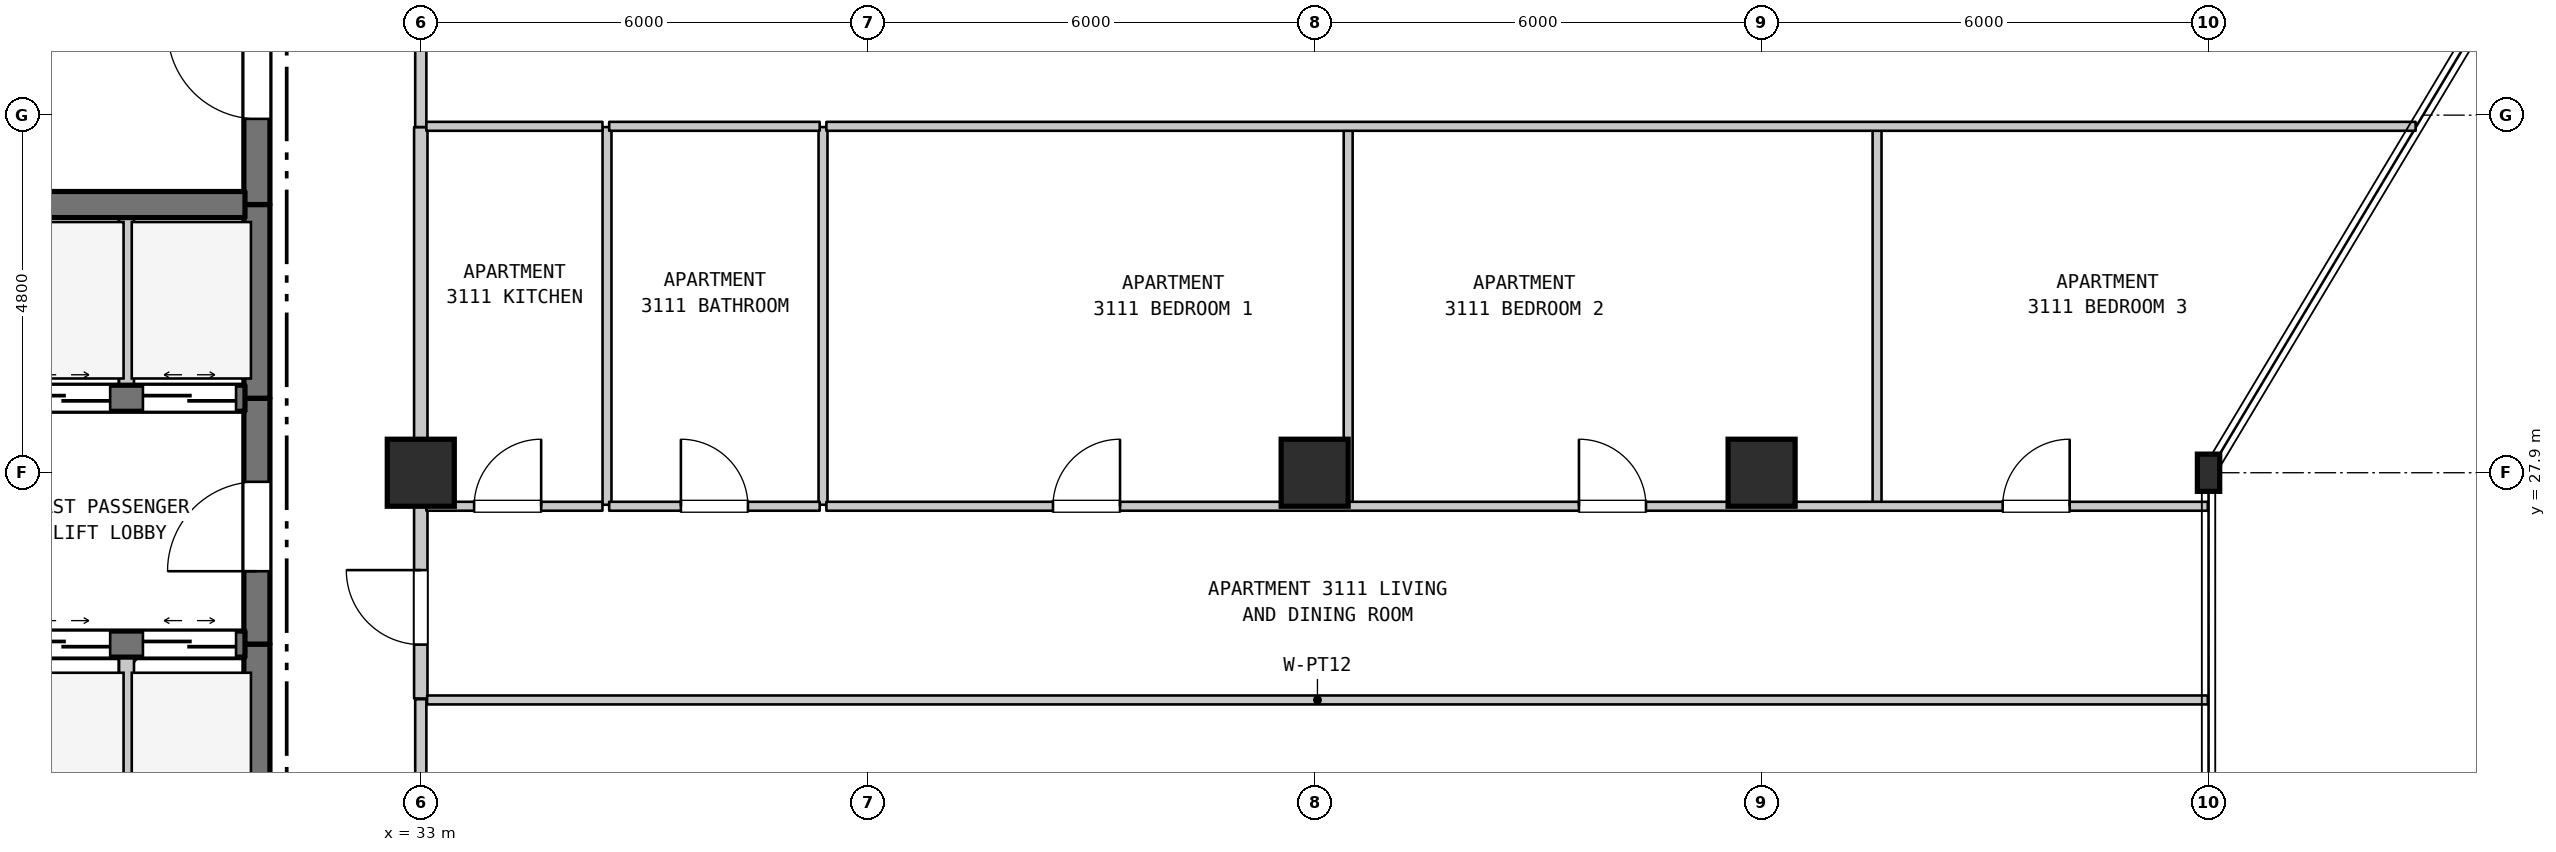
"""IFC4 building model, lengths in metres.
Left out: names, types, materials, properties, quantities, classifications, styles, units other than length and angle.
Written with IfcOpenShell. Run it as: python <this file> out.ifc"""

import sys

from ifc_helpers import new_model, si_unit, direction, frame, frame_2d, origin, origin_2d, place, context, subcontext, project, spatial, rectangle, i_section, extrude, element, fill, save


model = new_model("IFC4")
c1 = context("Model", 3, precision=1e-05, world=origin(), true_north=direction((0.0, 1.0)))
c2 = subcontext(c1, "Body", "Model", "MODEL_VIEW")
j1 = project(units=[si_unit("LENGTHUNIT", "METRE"), si_unit("PLANEANGLEUNIT", "RADIAN")], contexts=[c1])
p1 = place(None, origin())
s1 = spatial("IfcSite", under=j1, at=p1, CompositionType="ELEMENT")
p2 = place(p1, origin())
s2 = spatial("IfcBuilding", under=s1, at=p2, CompositionType="ELEMENT")
p3 = place(p2, frame((0.0, 0.0, 129.8)))
s3 = spatial("IfcBuildingStorey", under=s2, at=p3, CompositionType="ELEMENT", Elevation=129.8)
for number, where, z_axis, x_axis in (
    (1, (33.0, 27.9, 0.0), (0.0, 0.0, 1.0), (1.0, 0.0, 0.0)),
    (2, (45.0, 27.9, 0.0), (0.0, 0.0, 1.0), (1.0, 0.0, 0.0)),
    (3, (51.0, 27.9, 0.0), (0.0, 0.0, 1.0), (1.0, 0.0, 0.0)),
):
    element("IfcColumn", number, at=place(p3, frame(where, z_axis=z_axis, x_axis=x_axis)), inside=s3, PredefinedType="COLUMN", context=c2, shape_type="SweptSolid", body=[
        extrude(rectangle(XDim=0.9, YDim=0.9, at=origin_2d()), origin(), (0.0, 0.0, 1.0), 3.7),
    ])
p4 = place(p3, frame((57.0, 27.9, 0.0), z_axis=(0.0, 0.0, 1.0), x_axis=(1.0, 0.0, 0.0)))
e4 = element("IfcColumn", 4, at=p4, inside=s3, PredefinedType="COLUMN", context=c2, shape_type="SweptSolid", body=[
    extrude(i_section(OverallWidth=0.3, OverallDepth=0.5, WebThickness=0.014, FlangeThickness=0.028, FilletRadius=0.027, at=origin_2d()), origin(), (0.0, 0.0, 1.0), 3.7),
])
p5 = place(p3, frame((29.05, 22.7, 0.0), z_axis=(0.0, 0.0, 1.0), x_axis=(0.0, 1.0, 0.0)))
e5 = element("IfcWall", 5, at=p5, inside=s3, PredefinedType="STANDARD", context=c2, shape_type="SweptSolid", body=[
    extrude(rectangle(XDim=2.9, YDim=0.2, at=frame_2d((1.45, 0.0))), origin(), (0.0, 0.0, 1.0), 3.385),
])
p6 = place(p3, frame((29.05, 28.9, 0.0), z_axis=(0.0, 0.0, 1.0), x_axis=(0.0, 1.0, 0.0)))
e6 = element("IfcWall", 6, at=p6, inside=s3, PredefinedType="STANDARD", context=c2, shape_type="SweptSolid", body=[
    extrude(rectangle(XDim=2.6, YDim=0.2, at=frame_2d((1.3, 0.0))), origin(), (0.0, 0.0, 1.0), 3.385),
])
p7 = place(p3, frame((30.8, 22.7, 0.0), z_axis=(0.0, 0.0, 1.0), x_axis=(0.0, 1.0, 0.0)))
e7 = element("IfcWall", 7, at=p7, inside=s3, PredefinedType="SHEAR", context=c2, shape_type="SweptSolid", body=[
    extrude(rectangle(XDim=2.9, YDim=0.35, at=frame_2d((1.45, 0.0))), origin(), (0.0, 0.0, 1.0), 3.385),
])
p8 = place(p3, frame((30.8, 25.6, 0.0), z_axis=(0.0, 0.0, 1.0), x_axis=(0.0, 1.0, 0.0)))
e8 = element("IfcWall", 8, at=p8, inside=s3, PredefinedType="SHEAR", context=c2, shape_type="SweptSolid", body=[
    extrude(rectangle(XDim=3.3, YDim=0.35, at=frame_2d((1.65, 0.0))), origin(), (0.0, 0.0, 1.0), 3.385),
])
p9 = place(p8, frame((0.978, 0.0, 0.0)))
e9 = element("IfcOpeningElement", 9, at=p9, cuts=e8, PredefinedType="OPENING", context=c2, shape_type="SweptSolid", body=[
    extrude(rectangle(XDim=1.2, YDim=2.2, at=frame_2d((0.6, 1.1))), frame((0.0, 0.185, 0.0), z_axis=(0.0, -1.0, 0.0), x_axis=(1.0, 0.0, 0.0)), (0.0, 0.0, 1.0), 0.37),
])
p10 = place(p3, frame((30.8, 28.9, 0.0), z_axis=(0.0, 0.0, 1.0), x_axis=(0.0, 1.0, 0.0)))
e10 = element("IfcWall", 10, at=p10, inside=s3, PredefinedType="SHEAR", context=c2, shape_type="SweptSolid", body=[
    extrude(rectangle(XDim=2.6, YDim=0.35, at=frame_2d((1.3, 0.0))), origin(), (0.0, 0.0, 1.0), 3.385),
])
p11 = place(p3, frame((30.8, 31.5, 0.0), z_axis=(0.0, 0.0, 1.0), x_axis=(0.0, 1.0, 0.0)))
e11 = element("IfcWall", 11, at=p11, inside=s3, PredefinedType="SHEAR", context=c2, shape_type="SweptSolid", body=[
    extrude(rectangle(XDim=3.5, YDim=0.35, at=frame_2d((1.75, 0.0))), origin(), (0.0, 0.0, 1.0), 3.385),
])
p12 = place(p11, frame((1.15, 0.0, 0.0)))
e12 = element("IfcOpeningElement", 12, at=p12, cuts=e11, PredefinedType="OPENING", context=c2, shape_type="SweptSolid", body=[
    extrude(rectangle(XDim=1.2, YDim=2.2, at=frame_2d((0.6, 1.1))), frame((0.0, 0.185, 0.0), z_axis=(0.0, -1.0, 0.0), x_axis=(1.0, 0.0, 0.0)), (0.0, 0.0, 1.0), 0.37),
])
p13 = place(p3, frame((33.0, 19.51, 0.0), z_axis=(0.0, 0.0, 1.0), x_axis=(0.0, 1.0, 0.0)))
e13 = element("IfcWall", 13, at=p13, inside=s3, PredefinedType="STANDARD", context=c2, shape_type="SweptSolid", body=[
    extrude(rectangle(XDim=5.35, YDim=0.15, at=frame_2d((2.675, 0.0))), origin(), (0.0, 0.0, 1.0), 2.935),
])
p14 = place(p13, frame((1.534, 0.0, 0.0)))
e14 = element("IfcOpeningElement", 14, at=p14, cuts=e13, PredefinedType="OPENING", context=c2, shape_type="SweptSolid", body=[
    extrude(rectangle(XDim=1.0, YDim=2.15, at=frame_2d((0.5, 1.075))), frame((0.0, 0.085, 0.0), z_axis=(0.0, -1.0, 0.0), x_axis=(1.0, 0.0, 0.0)), (0.0, 0.0, 1.0), 0.17),
])
p15 = place(p3, frame((33.0, 24.87, 0.0), z_axis=(0.0, 0.0, 1.0), x_axis=(0.0, 1.0, 0.0)))
e15 = element("IfcWall", 15, at=p15, inside=s3, PredefinedType="STANDARD", context=c2, shape_type="SweptSolid", body=[
    extrude(rectangle(XDim=2.6, YDim=0.18, at=frame_2d((1.3, 0.0))), origin(), (0.0, 0.0, 1.0), 2.935),
])
p16 = place(p15, frame((0.723, 0.0, 0.0)))
e16 = element("IfcOpeningElement", 16, at=p16, cuts=e15, PredefinedType="OPENING", context=c2, shape_type="SweptSolid", body=[
    extrude(rectangle(XDim=1.0, YDim=2.15, at=frame_2d((0.5, 1.075))), frame((0.0, 0.1, 0.0), z_axis=(0.0, -1.0, 0.0), x_axis=(1.0, 0.0, 0.0)), (0.0, 0.0, 1.0), 0.2),
])
p17 = place(p3, frame((33.0, 27.47, 0.0), z_axis=(0.0, 0.0, 1.0), x_axis=(0.0, 1.0, 0.0)))
e17 = element("IfcWall", 17, at=p17, inside=s3, PredefinedType="STANDARD", context=c2, shape_type="SweptSolid", body=[
    extrude(rectangle(XDim=5.07, YDim=0.18, at=frame_2d((2.535, 0.0))), origin(), (0.0, 0.0, 1.0), 2.885),
])
p18 = place(p3, frame((33.0, 32.54, 0.0), z_axis=(0.0, 0.0, 1.0), x_axis=(0.0, 1.0, 0.0)))
e18 = element("IfcWall", 18, at=p18, inside=s3, PredefinedType="STANDARD", context=c2, shape_type="SweptSolid", body=[
    extrude(rectangle(XDim=5.36, YDim=0.15, at=frame_2d((2.68, 0.0))), origin(), (0.0, 0.0, 1.0), 2.885),
])
p19 = place(p18, frame((2.109, 0.0, 0.0)))
e19 = element("IfcOpeningElement", 19, at=p19, cuts=e18, PredefinedType="OPENING", context=c2, shape_type="SweptSolid", body=[
    extrude(rectangle(XDim=1.0, YDim=2.15, at=frame_2d((0.5, 1.075))), frame((0.0, 0.085, 0.0), z_axis=(0.0, -1.0, 0.0), x_axis=(1.0, 0.0, 0.0)), (0.0, 0.0, 1.0), 0.17),
])
for number, where, z_axis, x_axis in (
    (20, (35.5, 27.47, 0.0), (0.0, 0.0, 1.0), (0.0, 1.0, 0.0)),
    (21, (38.4, 27.47, 0.0), (0.0, 0.0, 1.0), (0.0, 1.0, 0.0)),
    (22, (45.45, 27.47, 0.0), (0.0, 0.0, 1.0), (0.0, 1.0, 0.0)),
    (23, (52.55, 27.47, 0.0), (0.0, 0.0, 1.0), (0.0, 1.0, 0.0)),
):
    element("IfcWall", number, at=place(p3, frame(where, z_axis=z_axis, x_axis=x_axis)), inside=s3, PredefinedType="PARTITIONING", context=c2, shape_type="SweptSolid", body=[
        extrude(rectangle(XDim=5.07, YDim=0.12, at=frame_2d((2.535, 0.0))), origin(), (0.0, 0.0, 1.0), 3.385),
    ])
p20 = place(p3, frame((33.085, 24.85, 0.0), z_axis=(0.0, 0.0, 1.0), x_axis=(1.0, 0.0, 0.0)))
e24 = element("IfcWall", 24, at=p20, inside=s3, PredefinedType="PARTITIONING", context=c2, shape_type="SweptSolid", body=[
    extrude(rectangle(XDim=23.905, YDim=0.12, at=frame_2d((11.953, 0.0))), origin(), (0.0, 0.0, 1.0), 3.385),
])
p21 = place(p3, frame((27.46, 25.6, 0.0), z_axis=(0.0, 0.0, 1.0), x_axis=(1.0, 0.0, 0.0)))
e25 = element("IfcWall", 25, at=p21, inside=s3, PredefinedType="SHEAR", context=c2, shape_type="SweptSolid", body=[
    extrude(rectangle(XDim=3.18, YDim=0.35, at=frame_2d((1.59, 0.0))), origin(), (0.0, 0.0, 1.0), 3.385),
])
p22 = place(p21, frame((0.12, 0.0, 0.0)))
e26 = element("IfcOpeningElement", 26, at=p22, cuts=e25, PredefinedType="OPENING", context=c2, shape_type="SweptSolid", body=[
    extrude(rectangle(XDim=1.25, YDim=2.2, at=frame_2d((0.625, 1.1))), frame((0.0, 0.185, 0.0), z_axis=(0.0, -1.0, 0.0), x_axis=(1.0, 0.0, 0.0)), (0.0, 0.0, 1.0), 0.37),
])
p23 = place(p21, frame((1.81, 0.0, 0.0)))
e27 = element("IfcOpeningElement", 27, at=p23, cuts=e25, PredefinedType="OPENING", context=c2, shape_type="SweptSolid", body=[
    extrude(rectangle(XDim=1.25, YDim=2.2, at=frame_2d((0.625, 1.1))), frame((0.0, 0.185, 0.0), z_axis=(0.0, -1.0, 0.0), x_axis=(1.0, 0.0, 0.0)), (0.0, 0.0, 1.0), 0.37),
])
p24 = place(p3, frame((33.075, 27.45, 0.0), z_axis=(0.0, 0.0, 1.0), x_axis=(1.0, 0.0, 0.0)))
e28 = element("IfcWall", 28, at=p24, inside=s3, PredefinedType="PARTITIONING", context=c2, shape_type="SweptSolid", body=[
    extrude(rectangle(XDim=2.364, YDim=0.12, at=frame_2d((1.182, 0.0))), origin(), (0.0, 0.0, 1.0), 3.385),
])
p25 = place(p24, frame((0.641, 0.0, 0.0)))
e29 = element("IfcOpeningElement", 29, at=p25, cuts=e28, PredefinedType="OPENING", context=c2, shape_type="SweptSolid", body=[
    extrude(rectangle(XDim=0.9, YDim=2.15, at=frame_2d((0.45, 1.075))), frame((0.0, 0.07, 0.0), z_axis=(0.0, -1.0, 0.0), x_axis=(1.0, 0.0, 0.0)), (0.0, 0.0, 1.0), 0.14),
])
p26 = place(p3, frame((35.529, 27.45, 0.0), z_axis=(0.0, 0.0, 1.0), x_axis=(1.0, 0.0, 0.0)))
e30 = element("IfcWall", 30, at=p26, inside=s3, PredefinedType="PARTITIONING", context=c2, shape_type="SweptSolid", body=[
    extrude(rectangle(XDim=2.826, YDim=0.12, at=frame_2d((1.413, 0.0))), origin(), (0.0, 0.0, 1.0), 3.385),
])
p27 = place(p26, frame((0.963, 0.0, 0.0)))
e31 = element("IfcOpeningElement", 31, at=p27, cuts=e30, PredefinedType="OPENING", context=c2, shape_type="SweptSolid", body=[
    extrude(rectangle(XDim=0.9, YDim=2.1, at=frame_2d((0.45, 1.05))), frame((0.0, 0.07, 0.0), z_axis=(0.0, -1.0, 0.0), x_axis=(1.0, 0.0, 0.0)), (0.0, 0.0, 1.0), 0.14),
])
p28 = place(p3, frame((38.445, 27.45, 0.0), z_axis=(0.0, 0.0, 1.0), x_axis=(1.0, 0.0, 0.0)))
e32 = element("IfcWall", 32, at=p28, inside=s3, PredefinedType="PARTITIONING", context=c2, shape_type="SweptSolid", body=[
    extrude(rectangle(XDim=18.545, YDim=0.12, at=frame_2d((9.272, 0.0))), origin(), (0.0, 0.0, 1.0), 3.385),
])
p29 = place(p28, frame((3.042, 0.0, 0.0)))
e33 = element("IfcOpeningElement", 33, at=p29, cuts=e32, PredefinedType="OPENING", context=c2, shape_type="SweptSolid", body=[
    extrude(rectangle(XDim=0.9, YDim=2.15, at=frame_2d((0.45, 1.075))), frame((0.0, 0.07, 0.0), z_axis=(0.0, -1.0, 0.0), x_axis=(1.0, 0.0, 0.0)), (0.0, 0.0, 1.0), 0.14),
])
p30 = place(p28, frame((10.103, 0.0, 0.0)))
e34 = element("IfcOpeningElement", 34, at=p30, cuts=e32, PredefinedType="OPENING", context=c2, shape_type="SweptSolid", body=[
    extrude(rectangle(XDim=0.9, YDim=2.15, at=frame_2d((0.45, 1.075))), frame((0.0, 0.07, 0.0), z_axis=(0.0, -1.0, 0.0), x_axis=(1.0, 0.0, 0.0)), (0.0, 0.0, 1.0), 0.14),
])
p31 = place(p28, frame((15.791, 0.0, 0.0)))
e35 = element("IfcOpeningElement", 35, at=p31, cuts=e32, PredefinedType="OPENING", context=c2, shape_type="SweptSolid", body=[
    extrude(rectangle(XDim=0.9, YDim=2.15, at=frame_2d((0.45, 1.075))), frame((0.0, 0.07, 0.0), z_axis=(0.0, -1.0, 0.0), x_axis=(1.0, 0.0, 0.0)), (0.0, 0.0, 1.0), 0.14),
])
p32 = place(p3, frame((27.46, 28.9, 0.0), z_axis=(0.0, 0.0, 1.0), x_axis=(1.0, 0.0, 0.0)))
e36 = element("IfcWall", 36, at=p32, inside=s3, PredefinedType="SHEAR", context=c2, shape_type="SweptSolid", body=[
    extrude(rectangle(XDim=3.18, YDim=0.35, at=frame_2d((1.59, 0.0))), origin(), (0.0, 0.0, 1.0), 3.385),
])
p33 = place(p32, frame((0.12, 0.0, 0.0)))
e37 = element("IfcOpeningElement", 37, at=p33, cuts=e36, PredefinedType="OPENING", context=c2, shape_type="SweptSolid", body=[
    extrude(rectangle(XDim=1.25, YDim=2.2, at=frame_2d((0.625, 1.1))), frame((0.0, 0.185, 0.0), z_axis=(0.0, -1.0, 0.0), x_axis=(1.0, 0.0, 0.0)), (0.0, 0.0, 1.0), 0.37),
])
p34 = place(p32, frame((1.81, 0.0, 0.0)))
e38 = element("IfcOpeningElement", 38, at=p34, cuts=e36, PredefinedType="OPENING", context=c2, shape_type="SweptSolid", body=[
    extrude(rectangle(XDim=1.25, YDim=2.2, at=frame_2d((0.625, 1.1))), frame((0.0, 0.185, 0.0), z_axis=(0.0, -1.0, 0.0), x_axis=(1.0, 0.0, 0.0)), (0.0, 0.0, 1.0), 0.37),
])
p35 = place(p3, frame((27.46, 31.5, 0.0), z_axis=(0.0, 0.0, 1.0), x_axis=(1.0, 0.0, 0.0)))
e39 = element("IfcWall", 39, at=p35, inside=s3, PredefinedType="SHEAR", context=c2, shape_type="SweptSolid", body=[
    extrude(rectangle(XDim=3.18, YDim=0.35, at=frame_2d((1.59, 0.0))), origin(), (0.0, 0.0, 1.0), 3.385),
])
p36 = place(p3, frame((33.075, 32.55, 0.0), z_axis=(0.0, 0.0, 1.0), x_axis=(1.0, 0.0, 0.0)))
e40 = element("IfcWall", 40, at=p36, inside=s3, PredefinedType="PARTITIONING", context=c2, shape_type="SweptSolid", body=[
    extrude(rectangle(XDim=2.364, YDim=0.12, at=frame_2d((1.182, 0.0))), origin(), (0.0, 0.0, 1.0), 3.385),
])
p37 = place(p3, frame((35.529, 32.55, 0.0), z_axis=(0.0, 0.0, 1.0), x_axis=(1.0, 0.0, 0.0)))
e41 = element("IfcWall", 41, at=p37, inside=s3, PredefinedType="PARTITIONING", context=c2, shape_type="SweptSolid", body=[
    extrude(rectangle(XDim=2.826, YDim=0.12, at=frame_2d((1.413, 0.0))), origin(), (0.0, 0.0, 1.0), 3.385),
])
p38 = place(p3, frame((38.445, 32.55, 0.0), z_axis=(0.0, 0.0, 1.0), x_axis=(1.0, 0.0, 0.0)))
e42 = element("IfcWall", 42, at=p38, inside=s3, PredefinedType="PARTITIONING", context=c2, shape_type="SweptSolid", body=[
    extrude(rectangle(XDim=21.335, YDim=0.12, at=frame_2d((10.667, 0.0))), origin(), (0.0, 0.0, 1.0), 3.385),
])
p39 = place(p9, origin())
e43 = element("IfcDoor", 43, at=p39, inside=s3, OperationType="SINGLE_SWING_LEFT", PredefinedType="DOOR", context=c2, shape_type="SweptSolid", body=[
    extrude(rectangle(XDim=1.2, YDim=2.2, at=frame_2d((0.6, 1.1))), frame((0.0, 0.025, 0.0), z_axis=(0.0, -1.0, 0.0), x_axis=(1.0, 0.0, 0.0)), (0.0, 0.0, 1.0), 0.05),
])
fill(e9, e43)
p40 = place(p12, origin())
e44 = element("IfcDoor", 44, at=p40, inside=s3, OperationType="SINGLE_SWING_RIGHT", PredefinedType="DOOR", context=c2, shape_type="SweptSolid", body=[
    extrude(rectangle(XDim=1.2, YDim=2.2, at=frame_2d((0.6, 1.1))), frame((0.0, 0.025, 0.0), z_axis=(0.0, -1.0, 0.0), x_axis=(1.0, 0.0, 0.0)), (0.0, 0.0, 1.0), 0.05),
])
fill(e12, e44)
p41 = place(p16, origin())
e45 = element("IfcDoor", 45, at=p41, inside=s3, OperationType="SINGLE_SWING_RIGHT", PredefinedType="DOOR", context=c2, shape_type="SweptSolid", body=[
    extrude(rectangle(XDim=1.0, YDim=2.15, at=frame_2d((0.5, 1.075))), frame((0.0, 0.025, 0.0), z_axis=(0.0, -1.0, 0.0), x_axis=(1.0, 0.0, 0.0)), (0.0, 0.0, 1.0), 0.05),
])
fill(e16, e45)
p42 = place(p22, origin())
e46 = element("IfcDoor", 46, at=p42, inside=s3, OperationType="DOUBLE_DOOR_SLIDING", PredefinedType="DOOR", context=c2, shape_type="SweptSolid", body=[
    extrude(rectangle(XDim=1.25, YDim=2.2, at=frame_2d((0.625, 1.1))), frame((0.0, 0.025, 0.0), z_axis=(0.0, -1.0, 0.0), x_axis=(1.0, 0.0, 0.0)), (0.0, 0.0, 1.0), 0.05),
])
fill(e26, e46)
p43 = place(p23, origin())
e47 = element("IfcDoor", 47, at=p43, inside=s3, OperationType="DOUBLE_DOOR_SLIDING", PredefinedType="DOOR", context=c2, shape_type="SweptSolid", body=[
    extrude(rectangle(XDim=1.25, YDim=2.2, at=frame_2d((0.625, 1.1))), frame((0.0, 0.025, 0.0), z_axis=(0.0, -1.0, 0.0), x_axis=(1.0, 0.0, 0.0)), (0.0, 0.0, 1.0), 0.05),
])
fill(e27, e47)
p44 = place(p25, origin())
e48 = element("IfcDoor", 48, at=p44, inside=s3, OperationType="SINGLE_SWING_RIGHT", PredefinedType="DOOR", context=c2, shape_type="SweptSolid", body=[
    extrude(rectangle(XDim=0.9, YDim=2.15, at=frame_2d((0.45, 1.075))), frame((0.0, 0.025, 0.0), z_axis=(0.0, -1.0, 0.0), x_axis=(1.0, 0.0, 0.0)), (0.0, 0.0, 1.0), 0.05),
])
fill(e29, e48)
p45 = place(p27, origin())
e49 = element("IfcDoor", 49, at=p45, inside=s3, OperationType="SINGLE_SWING_LEFT", PredefinedType="DOOR", context=c2, shape_type="SweptSolid", body=[
    extrude(rectangle(XDim=0.9, YDim=2.1, at=frame_2d((0.45, 1.05))), frame((0.0, 0.025, 0.0), z_axis=(0.0, -1.0, 0.0), x_axis=(1.0, 0.0, 0.0)), (0.0, 0.0, 1.0), 0.05),
])
fill(e31, e49)
p46 = place(p29, origin())
e50 = element("IfcDoor", 50, at=p46, inside=s3, OperationType="SINGLE_SWING_RIGHT", PredefinedType="DOOR", context=c2, shape_type="SweptSolid", body=[
    extrude(rectangle(XDim=0.9, YDim=2.15, at=frame_2d((0.45, 1.075))), frame((0.0, 0.025, 0.0), z_axis=(0.0, -1.0, 0.0), x_axis=(1.0, 0.0, 0.0)), (0.0, 0.0, 1.0), 0.05),
])
fill(e33, e50)
p47 = place(p30, origin())
e51 = element("IfcDoor", 51, at=p47, inside=s3, OperationType="SINGLE_SWING_LEFT", PredefinedType="DOOR", context=c2, shape_type="SweptSolid", body=[
    extrude(rectangle(XDim=0.9, YDim=2.15, at=frame_2d((0.45, 1.075))), frame((0.0, 0.025, 0.0), z_axis=(0.0, -1.0, 0.0), x_axis=(1.0, 0.0, 0.0)), (0.0, 0.0, 1.0), 0.05),
])
fill(e34, e51)
p48 = place(p31, origin())
e52 = element("IfcDoor", 52, at=p48, inside=s3, OperationType="SINGLE_SWING_RIGHT", PredefinedType="DOOR", context=c2, shape_type="SweptSolid", body=[
    extrude(rectangle(XDim=0.9, YDim=2.15, at=frame_2d((0.45, 1.075))), frame((0.0, 0.025, 0.0), z_axis=(0.0, -1.0, 0.0), x_axis=(1.0, 0.0, 0.0)), (0.0, 0.0, 1.0), 0.05),
])
fill(e35, e52)
p49 = place(p33, origin())
e53 = element("IfcDoor", 53, at=p49, inside=s3, OperationType="DOUBLE_DOOR_SLIDING", PredefinedType="DOOR", context=c2, shape_type="SweptSolid", body=[
    extrude(rectangle(XDim=1.25, YDim=2.2, at=frame_2d((0.625, 1.1))), frame((0.0, 0.025, 0.0), z_axis=(0.0, -1.0, 0.0), x_axis=(1.0, 0.0, 0.0)), (0.0, 0.0, 1.0), 0.05),
])
fill(e37, e53)
p50 = place(p34, origin())
e54 = element("IfcDoor", 54, at=p50, inside=s3, OperationType="DOUBLE_DOOR_SLIDING", PredefinedType="DOOR", context=c2, shape_type="SweptSolid", body=[
    extrude(rectangle(XDim=1.25, YDim=2.2, at=frame_2d((0.625, 1.1))), frame((0.0, 0.025, 0.0), z_axis=(0.0, -1.0, 0.0), x_axis=(1.0, 0.0, 0.0)), (0.0, 0.0, 1.0), 0.05),
])
fill(e38, e54)
save(model, sys.argv[1])
